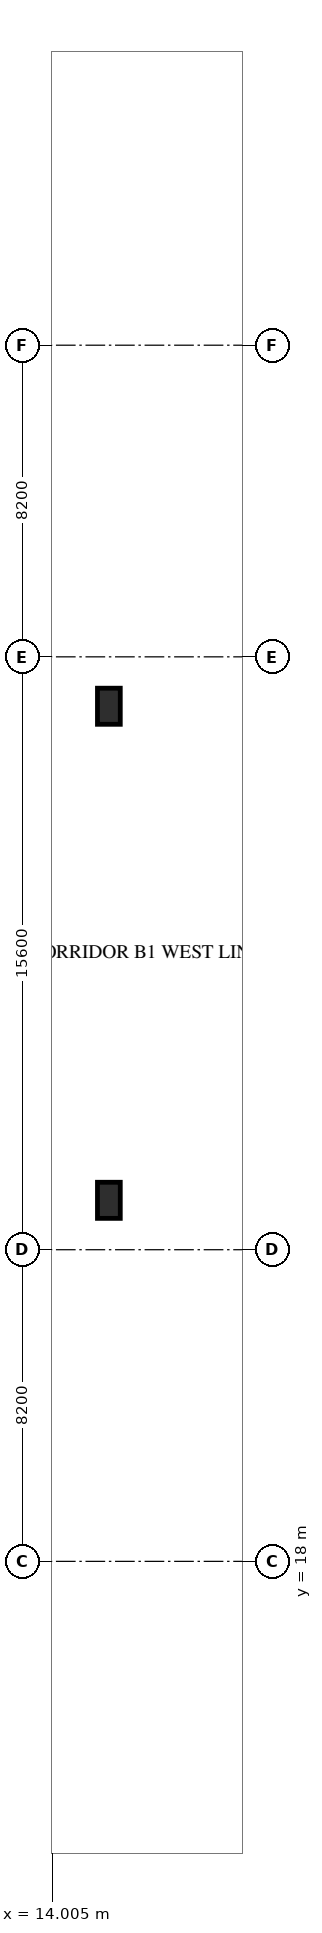
"""IFC4 building model, lengths in metres.
Left out: names, types, materials, properties, quantities, classifications, styles, units other than length and angle.
Written with IfcOpenShell. Run it as: python <this file> out.ifc"""

import sys

from ifc_helpers import new_model, si_unit, direction, frame, origin, origin_2d, place, context, subcontext, project, spatial, rectangle, extrude, element, save


model = new_model("IFC4")
c1 = context("Model", 3, precision=1e-05, world=origin(), true_north=direction((0.0, 1.0)))
c2 = subcontext(c1, "Body", "Model", "MODEL_VIEW")
j1 = project(units=[si_unit("LENGTHUNIT", "METRE"), si_unit("PLANEANGLEUNIT", "RADIAN")], contexts=[c1])
p1 = place(None, origin())
s1 = spatial("IfcSite", under=j1, at=p1, CompositionType="ELEMENT")
p2 = place(p1, origin())
s2 = spatial("IfcBuilding", under=s1, at=p2, CompositionType="ELEMENT")
p3 = place(p2, frame((0.0, 0.0, -6.0)))
s3 = spatial("IfcBuildingStorey", under=s2, at=p3, CompositionType="ELEMENT", Elevation=-6.0)
for number, where, z_axis, x_axis in (
    (1, (15.5, 27.5, 0.0), (0.0, 0.0, 1.0), (1.0, 0.0, 0.0)),
    (2, (15.5, 40.5, 0.0), (0.0, 0.0, 1.0), (1.0, 0.0, 0.0)),
):
    element("IfcColumn", number, at=place(p3, frame(where, z_axis=z_axis, x_axis=x_axis)), inside=s3, PredefinedType="PILASTER", context=c2, shape_type="SweptSolid", body=[
        extrude(rectangle(XDim=0.6, YDim=0.95, at=origin_2d()), origin(), (0.0, 0.0, 1.0), 6.001),
    ])
save(model, sys.argv[1])
